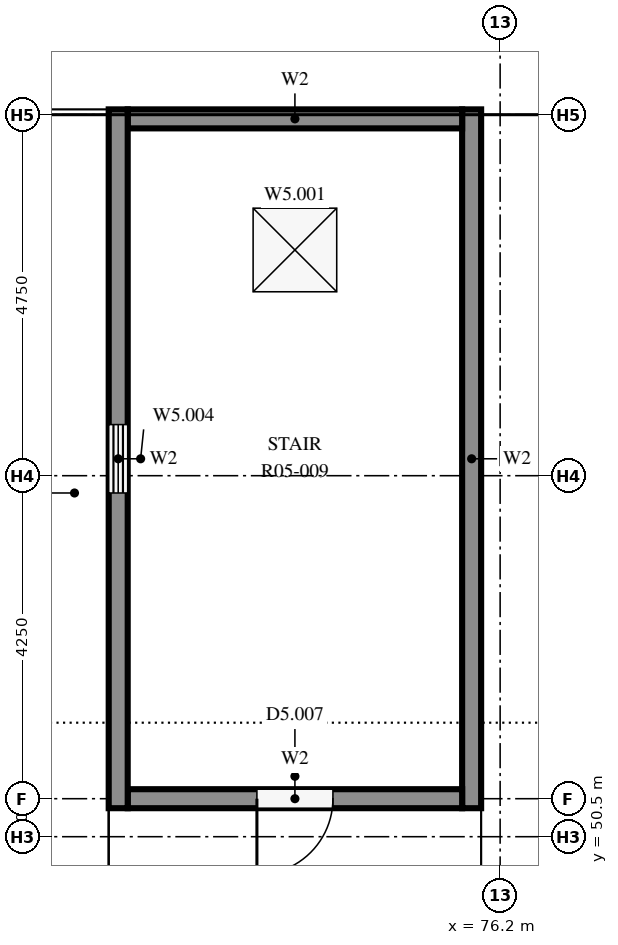
"""IFC4 building model, lengths in metres.
Left out: names, types, materials, properties, quantities, classifications, styles, units other than length and angle.
Written with IfcOpenShell. Run it as: python <this file> out.ifc"""

import sys

from ifc_helpers import new_model, si_unit, direction, frame, frame_2d, origin, origin_2d, place, context, subcontext, project, spatial, rectangle, extrude, element, fill, save


model = new_model("IFC4")
c1 = context("Model", 3, precision=1e-05, world=origin(), true_north=direction((0.0, 1.0)))
c2 = subcontext(c1, "Body", "Model", "MODEL_VIEW")
j1 = project(units=[si_unit("LENGTHUNIT", "METRE"), si_unit("PLANEANGLEUNIT", "RADIAN")], contexts=[c1])
p1 = place(None, origin())
s1 = spatial("IfcSite", under=j1, at=p1, CompositionType="ELEMENT")
p2 = place(p1, origin())
s2 = spatial("IfcBuilding", under=s1, at=p2, CompositionType="ELEMENT")
p3 = place(p2, frame((0.0, 0.0, 18.9)))
s3 = spatial("IfcBuildingStorey", under=s2, at=p3, CompositionType="ELEMENT", Elevation=18.9)
p4 = place(p3, frame((71.175, 50.875, 0.0), z_axis=(0.0, 0.0, 1.0), x_axis=(0.0, 1.0, 0.0)))
e1 = element("IfcWall", 1, at=p4, inside=s3, PredefinedType="SOLIDWALL", context=c2, shape_type="SweptSolid", body=[
    extrude(rectangle(XDim=9.195, YDim=0.25, at=frame_2d((4.598, 0.0))), origin(), (0.0, 0.0, 1.0), 2.45),
])
p5 = place(p4, frame((4.147, 0.0, 0.9)))
e2 = element("IfcOpeningElement", 2, at=p5, cuts=e1, PredefinedType="OPENING", context=c2, shape_type="SweptSolid", body=[
    extrude(rectangle(XDim=0.9, YDim=1.2, at=frame_2d((0.45, 0.6))), frame((0.0, 0.135, 0.0), z_axis=(0.0, -1.0, 0.0), x_axis=(1.0, 0.0, 0.0)), (0.0, 0.0, 1.0), 0.27),
])
p6 = place(p3, frame((75.825, 50.875, 0.0), z_axis=(0.0, 0.0, 1.0), x_axis=(0.0, 1.0, 0.0)))
e3 = element("IfcWall", 3, at=p6, inside=s3, PredefinedType="SOLIDWALL", context=c2, shape_type="SweptSolid", body=[
    extrude(rectangle(XDim=9.195, YDim=0.25, at=frame_2d((4.598, 0.0))), origin(), (0.0, 0.0, 1.0), 2.45),
])
p7 = place(p3, frame((75.7, 51.0, 0.0), z_axis=(0.0, 0.0, 1.0), x_axis=(-1.0, 0.0, 0.0)))
e4 = element("IfcWall", 4, at=p7, inside=s3, PredefinedType="SOLIDWALL", context=c2, shape_type="SweptSolid", body=[
    extrude(rectangle(XDim=4.4, YDim=0.25, at=frame_2d((2.2, 0.0))), origin(), (0.0, 0.0, 1.0), 2.45),
])
p8 = place(p7, frame((1.7, 0.0, 0.0)))
e5 = element("IfcOpeningElement", 5, at=p8, cuts=e4, PredefinedType="OPENING", context=c2, shape_type="SweptSolid", body=[
    extrude(rectangle(XDim=1.0, YDim=2.1, at=frame_2d((0.5, 1.05))), frame((0.0, 0.135, 0.0), z_axis=(0.0, -1.0, 0.0), x_axis=(1.0, 0.0, 0.0)), (0.0, 0.0, 1.0), 0.27),
])
p9 = place(p3, frame((71.3, 59.945, 0.0), z_axis=(0.0, 0.0, 1.0), x_axis=(1.0, 0.0, 0.0)))
e6 = element("IfcWall", 6, at=p9, inside=s3, PredefinedType="SOLIDWALL", context=c2, shape_type="SweptSolid", body=[
    extrude(rectangle(XDim=4.4, YDim=0.25, at=frame_2d((2.2, 0.0))), origin(), (0.0, 0.0, 1.0), 2.45),
])
p10 = place(p3, frame((0.0, 0.0, 2.45)))
p11 = place(p10, frame((73.5, 58.22, 0.0)))
p12 = place(p11, frame((0.0, 0.0, 0.15)))
e7 = element("IfcWindow", 7, at=p12, inside=s3, PartitioningType="SINGLE_PANEL", PredefinedType="SKYLIGHT", context=c2, shape_type="SweptSolid", body=[
    extrude(rectangle(XDim=1.1, YDim=1.1, at=origin_2d()), origin(), (0.0, 0.0, 1.0), 0.05),
])
p13 = place(p8, origin())
e8 = element("IfcDoor", 8, at=p13, inside=s3, OperationType="SINGLE_SWING_RIGHT", PredefinedType="DOOR", context=c2, shape_type="SweptSolid", body=[
    extrude(rectangle(XDim=1.0, YDim=2.1, at=frame_2d((0.5, 1.05))), frame((0.0, 0.025, 0.0), z_axis=(0.0, -1.0, 0.0), x_axis=(1.0, 0.0, 0.0)), (0.0, 0.0, 1.0), 0.05),
])
fill(e5, e8)
p14 = place(p5, origin())
e9 = element("IfcWindow", 9, at=p14, inside=s3, PartitioningType="SINGLE_PANEL", PredefinedType="WINDOW", context=c2, shape_type="SweptSolid", body=[
    extrude(rectangle(XDim=0.9, YDim=1.2, at=frame_2d((0.45, 0.6))), frame((0.0, 0.03, 0.0), z_axis=(0.0, -1.0, 0.0), x_axis=(1.0, 0.0, 0.0)), (0.0, 0.0, 1.0), 0.06),
])
fill(e2, e9)
save(model, sys.argv[1])
